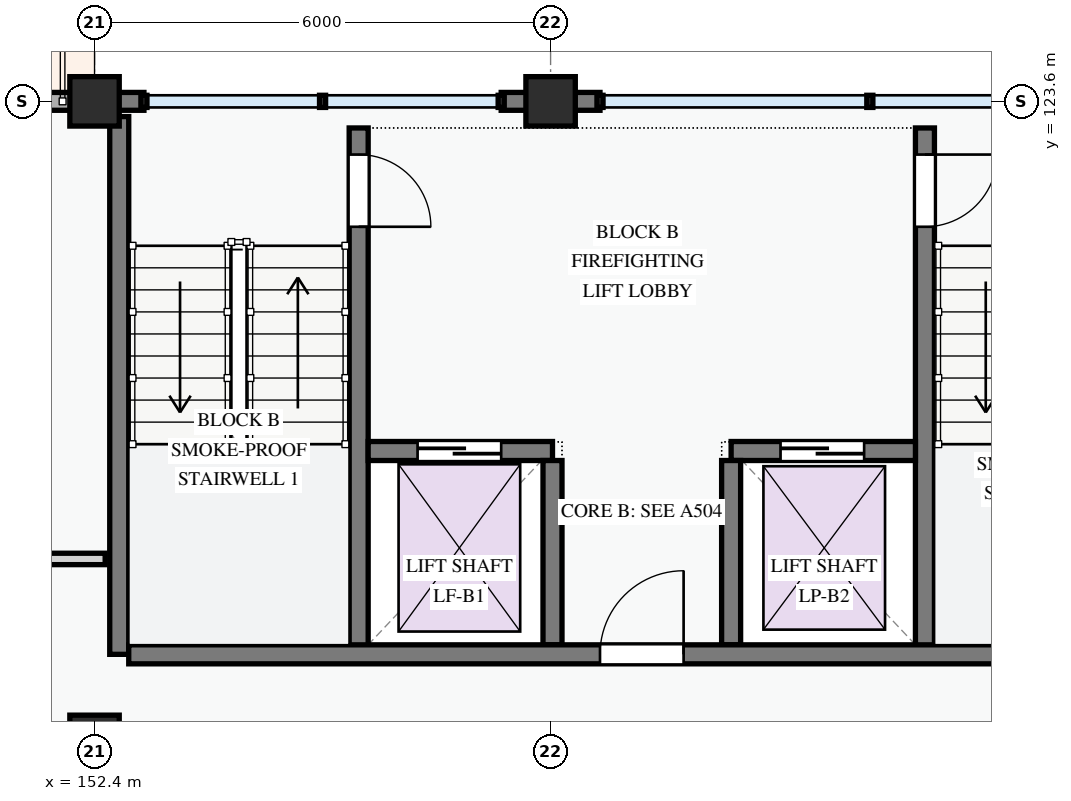
"""IFC4 building model, lengths in metres.
Left out: names, types, materials, properties, quantities, classifications, styles, units other than length and angle.
Written with IfcOpenShell. Run it as: python <this file> out.ifc"""

import sys

from ifc_helpers import new_model, si_unit, direction, frame, frame_2d, origin, origin_2d, place, context, subcontext, project, spatial, rectangle, extrude, element, fill, save


model = new_model("IFC4")
c1 = context("Model", 3, precision=1e-05, world=origin(), true_north=direction((0.0, 1.0)))
c2 = subcontext(c1, "Body", "Model", "MODEL_VIEW")
j1 = project(units=[si_unit("LENGTHUNIT", "METRE"), si_unit("PLANEANGLEUNIT", "RADIAN")], contexts=[c1])
p1 = place(None, origin())
s1 = spatial("IfcSite", under=j1, at=p1, CompositionType="ELEMENT")
p2 = place(p1, origin())
s2 = spatial("IfcBuilding", under=s1, at=p2, CompositionType="ELEMENT")
p3 = place(p2, frame((0.0, 0.0, 8.1)))
s3 = spatial("IfcBuildingStorey", under=s2, at=p3, CompositionType="ELEMENT", Elevation=8.1)
for number, where, z_axis, x_axis in (
    (1, (152.4, 115.2, 0.0), (0.0, 0.0, 1.0), (1.0, 0.0, 0.0)),
    (2, (152.4, 123.6, 0.0), (0.0, 0.0, 1.0), (1.0, 0.0, 0.0)),
    (3, (158.4, 123.6, 0.0), (0.0, 0.0, 1.0), (1.0, 0.0, 0.0)),
):
    element("IfcColumn", number, at=place(p3, frame(where, z_axis=z_axis, x_axis=x_axis)), inside=s3, PredefinedType="COLUMN", context=c2, shape_type="SweptSolid", body=[
        extrude(rectangle(XDim=0.65, YDim=0.65, at=origin_2d()), origin(), (0.0, 0.0, 1.0), 3.3),
    ])
p4 = place(p3, frame((159.05, 123.6, 0.0), z_axis=(0.0, 0.0, 1.0), x_axis=(-1.0, 0.0, 0.0)))
e4 = element("IfcWall", 4, at=p4, inside=s3, PredefinedType="STANDARD", context=c2, shape_type="SweptSolid", body=[
    extrude(rectangle(XDim=0.65, YDim=0.235, at=frame_2d((0.325, 0.0))), origin(), (0.0, 0.0, 1.0), 3.04),
])
p5 = place(p3, frame((158.4, 123.6, 0.0), z_axis=(0.0, 0.0, 1.0), x_axis=(-1.0, 0.0, 0.0)))
e5 = element("IfcWall", 5, at=p5, inside=s3, PredefinedType="STANDARD", context=c2, shape_type="SweptSolid", body=[
    extrude(rectangle(XDim=0.65, YDim=0.235, at=frame_2d((0.325, 0.0))), origin(), (0.0, 0.0, 1.0), 3.04),
])
p6 = place(p3, frame((153.05, 123.6, 0.0), z_axis=(0.0, 0.0, 1.0), x_axis=(-1.0, 0.0, 0.0)))
e6 = element("IfcWall", 6, at=p6, inside=s3, PredefinedType="STANDARD", context=c2, shape_type="SweptSolid", body=[
    extrude(rectangle(XDim=0.65, YDim=0.235, at=frame_2d((0.325, 0.0))), origin(), (0.0, 0.0, 1.0), 3.04),
])
p7 = place(p3, frame((152.4, 123.6, 0.0), z_axis=(0.0, 0.0, 1.0), x_axis=(-1.0, 0.0, 0.0)))
e7 = element("IfcWall", 7, at=p7, inside=s3, PredefinedType="STANDARD", context=c2, shape_type="SweptSolid", body=[
    extrude(rectangle(XDim=8.4, YDim=0.235, at=frame_2d((4.2, 0.0))), origin(), (0.0, 0.0, 1.0), 2.345),
])
p8 = place(p7, frame((0.62, 0.0, 0.0)))
e8 = element("IfcOpeningElement", 8, at=p8, cuts=e7, PredefinedType="OPENING", context=c2, shape_type="SweptSolid", body=[
    extrude(rectangle(XDim=1.4, YDim=2.2, at=frame_2d((0.7, 1.1))), frame((0.0, 0.127, 0.0), z_axis=(0.0, -1.0, 0.0), x_axis=(1.0, 0.0, 0.0)), (0.0, 0.0, 1.0), 0.255),
])
p9 = place(p7, frame((2.765, 0.0, 0.78)))
e9 = element("IfcOpeningElement", 9, at=p9, cuts=e7, PredefinedType="OPENING", context=c2, shape_type="SweptSolid", body=[
    extrude(rectangle(XDim=1.75, YDim=1.45, at=frame_2d((0.875, 0.725))), frame((0.0, 0.127, 0.0), z_axis=(0.0, -1.0, 0.0), x_axis=(1.0, 0.0, 0.0)), (0.0, 0.0, 1.0), 0.255),
])
p10 = place(p7, frame((5.93, 0.0, 0.78)))
e10 = element("IfcOpeningElement", 10, at=p10, cuts=e7, PredefinedType="OPENING", context=c2, shape_type="SweptSolid", body=[
    extrude(rectangle(XDim=1.42, YDim=1.38, at=frame_2d((0.71, 0.69))), frame((0.0, 0.127, 0.0), z_axis=(0.0, -1.0, 0.0), x_axis=(1.0, 0.0, 0.0)), (0.0, 0.0, 1.0), 0.255),
])
p11 = place(p3, frame((155.875, 123.25, 0.0), z_axis=(0.0, 0.0, 1.0), x_axis=(0.0, -1.0, 0.0)))
e11 = element("IfcWall", 11, at=p11, inside=s3, PredefinedType="SHEAR", context=c2, shape_type="SweptSolid", body=[
    extrude(rectangle(XDim=6.925, YDim=0.25, at=frame_2d((3.462, 0.0))), origin(), (0.0, 0.0, 1.0), 3.0),
])
p12 = place(p11, frame((0.35, 0.0, 0.0)))
e12 = element("IfcOpeningElement", 12, at=p12, cuts=e11, PredefinedType="OPENING", context=c2, shape_type="SweptSolid", body=[
    extrude(rectangle(XDim=0.95, YDim=2.1, at=frame_2d((0.475, 1.05))), frame((0.0, 0.135, 0.0), z_axis=(0.0, -1.0, 0.0), x_axis=(1.0, 0.0, 0.0)), (0.0, 0.0, 1.0), 0.27),
])
p13 = place(p3, frame((152.725, 123.4, 0.0), z_axis=(0.0, 0.0, 1.0), x_axis=(0.0, -1.0, 0.0)))
e13 = element("IfcWall", 13, at=p13, inside=s3, PredefinedType="SHEAR", context=c2, shape_type="SweptSolid", body=[
    extrude(rectangle(XDim=7.075, YDim=0.25, at=frame_2d((3.538, 0.0))), origin(), (0.0, 0.0, 1.0), 3.0),
])
p14 = place(p3, frame((163.325, 123.25, 0.0), z_axis=(0.0, 0.0, 1.0), x_axis=(0.0, -1.0, 0.0)))
e14 = element("IfcWall", 14, at=p14, inside=s3, PredefinedType="SHEAR", context=c2, shape_type="SweptSolid", body=[
    extrude(rectangle(XDim=6.925, YDim=0.25, at=frame_2d((3.462, 0.0))), origin(), (0.0, 0.0, 1.0), 3.0),
])
p15 = place(p14, frame((0.35, 0.0, 0.0)))
e15 = element("IfcOpeningElement", 15, at=p15, cuts=e14, PredefinedType="OPENING", context=c2, shape_type="SweptSolid", body=[
    extrude(rectangle(XDim=0.95, YDim=2.1, at=frame_2d((0.475, 1.05))), frame((0.0, 0.135, 0.0), z_axis=(0.0, -1.0, 0.0), x_axis=(1.0, 0.0, 0.0)), (0.0, 0.0, 1.0), 0.27),
])
p16 = place(p3, frame((156.0, 119.0, 0.0), z_axis=(0.0, 0.0, 1.0), x_axis=(1.0, 0.0, 0.0)))
e16 = element("IfcWall", 16, at=p16, inside=s3, PredefinedType="SHEAR", context=c2, shape_type="SweptSolid", body=[
    extrude(rectangle(XDim=2.425, YDim=0.25, at=frame_2d((1.212, 0.0))), origin(), (0.0, 0.0, 1.0), 3.0),
])
p17 = place(p16, frame((0.65, 0.0, 0.0)))
e17 = element("IfcOpeningElement", 17, at=p17, cuts=e16, PredefinedType="OPENING", context=c2, shape_type="SweptSolid", body=[
    extrude(rectangle(XDim=1.1, YDim=2.15, at=frame_2d((0.55, 1.075))), frame((0.0, 0.135, 0.0), z_axis=(0.0, -1.0, 0.0), x_axis=(1.0, 0.0, 0.0)), (0.0, 0.0, 1.0), 0.27),
])
p18 = place(p3, frame((160.775, 119.0, 0.0), z_axis=(0.0, 0.0, 1.0), x_axis=(1.0, 0.0, 0.0)))
e18 = element("IfcWall", 18, at=p18, inside=s3, PredefinedType="SHEAR", context=c2, shape_type="SweptSolid", body=[
    extrude(rectangle(XDim=2.425, YDim=0.25, at=frame_2d((1.212, 0.0))), origin(), (0.0, 0.0, 1.0), 3.0),
])
p19 = place(p18, frame((0.65, 0.0, 0.0)))
e19 = element("IfcOpeningElement", 19, at=p19, cuts=e18, PredefinedType="OPENING", context=c2, shape_type="SweptSolid", body=[
    extrude(rectangle(XDim=1.1, YDim=2.15, at=frame_2d((0.55, 1.075))), frame((0.0, 0.135, 0.0), z_axis=(0.0, -1.0, 0.0), x_axis=(1.0, 0.0, 0.0)), (0.0, 0.0, 1.0), 0.27),
])
for number, where, z_axis, x_axis in (
    (20, (158.425, 118.875, 0.0), (0.0, 0.0, 1.0), (0.0, -1.0, 0.0)),
    (21, (160.775, 118.875, 0.0), (0.0, 0.0, 1.0), (0.0, -1.0, 0.0)),
):
    element("IfcWall", number, at=place(p3, frame(where, z_axis=z_axis, x_axis=x_axis)), inside=s3, PredefinedType="SHEAR", context=c2, shape_type="SweptSolid", body=[
        extrude(rectangle(XDim=2.425, YDim=0.25, at=frame_2d((1.212, 0.0))), origin(), (0.0, 0.0, 1.0), 3.0),
    ])
p20 = place(p3, frame((152.85, 116.325, 0.0), z_axis=(0.0, 0.0, 1.0), x_axis=(1.0, 0.0, 0.0)))
e22 = element("IfcWall", 22, at=p20, inside=s3, PredefinedType="SHEAR", context=c2, shape_type="SweptSolid", body=[
    extrude(rectangle(XDim=13.5, YDim=0.25, at=frame_2d((6.75, 0.0))), origin(), (0.0, 0.0, 1.0), 3.0),
])
p21 = place(p20, frame((6.2, 0.0, 0.0)))
e23 = element("IfcOpeningElement", 23, at=p21, cuts=e22, PredefinedType="OPENING", context=c2, shape_type="SweptSolid", body=[
    extrude(rectangle(XDim=1.1, YDim=2.15, at=frame_2d((0.55, 1.075))), frame((0.0, 0.135, 0.0), z_axis=(0.0, -1.0, 0.0), x_axis=(1.0, 0.0, 0.0)), (0.0, 0.0, 1.0), 0.27),
])
p22 = place(p3, frame((80.52, 117.58, 0.0), z_axis=(0.0, 0.0, 1.0), x_axis=(1.0, 0.0, 0.0)))
e24 = element("IfcWall", 24, at=p22, inside=s3, PredefinedType="PARTITIONING", context=c2, shape_type="SweptSolid", body=[
    extrude(rectangle(XDim=72.021, YDim=0.15, at=frame_2d((36.01, 0.0))), origin(), (0.0, 0.0, 1.0), 3.0),
])
p23 = place(p22, frame((9.469, 0.0, 0.0)))
e25 = element("IfcOpeningElement", 25, at=p23, cuts=e24, PredefinedType="OPENING", context=c2, shape_type="SweptSolid", body=[
    extrude(rectangle(XDim=0.92, YDim=2.1, at=frame_2d((0.46, 1.05))), frame((0.0, 0.085, 0.0), z_axis=(0.0, -1.0, 0.0), x_axis=(1.0, 0.0, 0.0)), (0.0, 0.0, 1.0), 0.17),
])
p24 = place(p22, frame((23.851, 0.0, 0.0)))
e26 = element("IfcOpeningElement", 26, at=p24, cuts=e24, PredefinedType="OPENING", context=c2, shape_type="SweptSolid", body=[
    extrude(rectangle(XDim=0.92, YDim=2.1, at=frame_2d((0.46, 1.05))), frame((0.0, 0.085, 0.0), z_axis=(0.0, -1.0, 0.0), x_axis=(1.0, 0.0, 0.0)), (0.0, 0.0, 1.0), 0.17),
])
p25 = place(p22, frame((52.775, 0.0, 0.0)))
e27 = element("IfcOpeningElement", 27, at=p25, cuts=e24, PredefinedType="OPENING", context=c2, shape_type="SweptSolid", body=[
    extrude(rectangle(XDim=0.92, YDim=2.1, at=frame_2d((0.46, 1.05))), frame((0.0, 0.085, 0.0), z_axis=(0.0, -1.0, 0.0), x_axis=(1.0, 0.0, 0.0)), (0.0, 0.0, 1.0), 0.17),
])
p26 = place(p12, origin())
e28 = element("IfcDoor", 28, at=p26, inside=s3, OperationType="SINGLE_SWING_RIGHT", PredefinedType="DOOR", context=c2, shape_type="SweptSolid", body=[
    extrude(rectangle(XDim=0.95, YDim=2.1, at=frame_2d((0.475, 1.05))), frame((0.0, 0.025, 0.0), z_axis=(0.0, -1.0, 0.0), x_axis=(1.0, 0.0, 0.0)), (0.0, 0.0, 1.0), 0.05),
])
fill(e12, e28)
p27 = place(p15, origin())
e29 = element("IfcDoor", 29, at=p27, inside=s3, OperationType="SINGLE_SWING_LEFT", PredefinedType="DOOR", context=c2, shape_type="SweptSolid", body=[
    extrude(rectangle(XDim=0.95, YDim=2.1, at=frame_2d((0.475, 1.05))), frame((0.0, 0.025, 0.0), z_axis=(0.0, -1.0, 0.0), x_axis=(1.0, 0.0, 0.0)), (0.0, 0.0, 1.0), 0.05),
])
fill(e15, e29)
p28 = place(p17, origin())
e30 = element("IfcDoor", 30, at=p28, inside=s3, OperationType="SLIDING_TO_LEFT", PredefinedType="DOOR", context=c2, shape_type="SweptSolid", body=[
    extrude(rectangle(XDim=1.1, YDim=2.15, at=frame_2d((0.55, 1.075))), frame((0.0, 0.025, 0.0), z_axis=(0.0, -1.0, 0.0), x_axis=(1.0, 0.0, 0.0)), (0.0, 0.0, 1.0), 0.05),
])
fill(e17, e30)
p29 = place(p19, origin())
e31 = element("IfcDoor", 31, at=p29, inside=s3, OperationType="SLIDING_TO_LEFT", PredefinedType="DOOR", context=c2, shape_type="SweptSolid", body=[
    extrude(rectangle(XDim=1.1, YDim=2.15, at=frame_2d((0.55, 1.075))), frame((0.0, 0.025, 0.0), z_axis=(0.0, -1.0, 0.0), x_axis=(1.0, 0.0, 0.0)), (0.0, 0.0, 1.0), 0.05),
])
fill(e19, e31)
p30 = place(p21, origin())
e32 = element("IfcDoor", 32, at=p30, inside=s3, OperationType="SINGLE_SWING_RIGHT", PredefinedType="DOOR", context=c2, shape_type="SweptSolid", body=[
    extrude(rectangle(XDim=1.1, YDim=2.15, at=frame_2d((0.55, 1.075))), frame((0.0, 0.025, 0.0), z_axis=(0.0, -1.0, 0.0), x_axis=(1.0, 0.0, 0.0)), (0.0, 0.0, 1.0), 0.05),
])
fill(e23, e32)
save(model, sys.argv[1])
